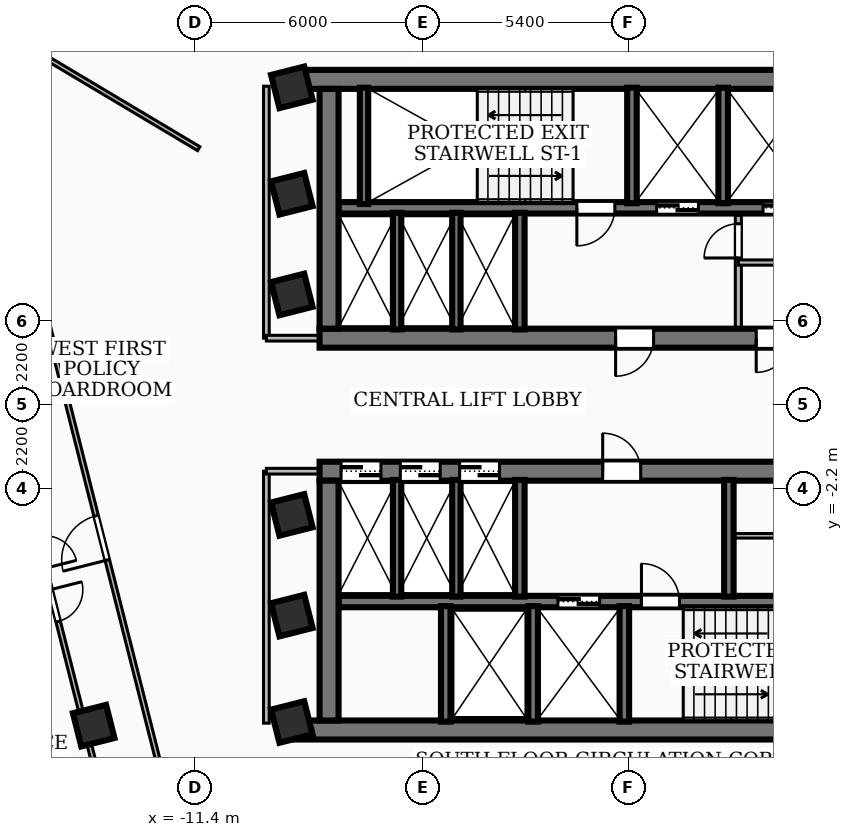
"""IFC4 building model, lengths in metres.
Left out: names, types, materials, properties, quantities, classifications, styles, units other than length and angle.
Written with IfcOpenShell. Run it as: python <this file> out.ifc"""

import sys

from ifc_helpers import new_model, si_unit, direction, frame, frame_2d, origin, origin_2d, place, context, subcontext, project, spatial, rectangle, extrude, element, fill, save


model = new_model("IFC4")
c1 = context("Model", 3, precision=1e-05, world=origin(), true_north=direction((0.0, 1.0)))
c2 = subcontext(c1, "Body", "Model", "MODEL_VIEW")
j1 = project(units=[si_unit("LENGTHUNIT", "METRE"), si_unit("PLANEANGLEUNIT", "RADIAN")], contexts=[c1])
p1 = place(None, origin())
s1 = spatial("IfcSite", under=j1, at=p1, CompositionType="ELEMENT")
p2 = place(p1, origin())
s2 = spatial("IfcBuilding", under=s1, at=p2, CompositionType="ELEMENT")
p3 = place(p2, frame((0.0, 0.0, 127.08)))
s3 = spatial("IfcBuildingStorey", under=s2, at=p3, CompositionType="ELEMENT", Elevation=127.08)
p4 = place(p3, frame((-8.78, 8.56, 0.0), z_axis=(0.0, 0.0, 1.0), x_axis=(1.0, 0.0, 0.0)))
e1 = element("IfcWall", 1, at=p4, inside=s3, PredefinedType="SHEAR", context=c2, shape_type="SweptSolid", body=[
    extrude(rectangle(XDim=17.56, YDim=0.5, at=frame_2d((8.78, 0.0))), origin(), (0.0, 0.0, 1.0), 3.34),
])
p5 = place(p3, frame((8.12, 1.75, 0.0), z_axis=(0.0, 0.0, 1.0), x_axis=(-1.0, 0.0, 0.0)))
e2 = element("IfcWall", 2, at=p5, inside=s3, PredefinedType="SHEAR", context=c2, shape_type="SweptSolid", body=[
    extrude(rectangle(XDim=16.24, YDim=0.5, at=frame_2d((8.12, 0.0))), origin(), (0.0, 0.0, 1.0), 3.34),
])
p6 = place(p5, frame((7.45, 0.0, 0.0)))
e3 = element("IfcOpeningElement", 3, at=p6, cuts=e2, PredefinedType="OPENING", context=c2, shape_type="SweptSolid", body=[
    extrude(rectangle(XDim=1.0, YDim=2.1, at=frame_2d((0.5, 1.05))), frame((0.0, 0.26, 0.0), z_axis=(0.0, -1.0, 0.0), x_axis=(1.0, 0.0, 0.0)), (0.0, 0.0, 1.0), 0.52),
])
p7 = place(p5, frame((3.85, 0.0, 0.0)))
e4 = element("IfcOpeningElement", 4, at=p7, cuts=e2, PredefinedType="OPENING", context=c2, shape_type="SweptSolid", body=[
    extrude(rectangle(XDim=0.9, YDim=2.06, at=frame_2d((0.45, 1.03))), frame((0.0, 0.26, 0.0), z_axis=(0.0, -1.0, 0.0), x_axis=(1.0, 0.0, 0.0)), (0.0, 0.0, 1.0), 0.52),
])
p8 = place(p5, frame((2.35, 0.0, 0.0)))
e5 = element("IfcOpeningElement", 5, at=p8, cuts=e2, PredefinedType="OPENING", context=c2, shape_type="SweptSolid", body=[
    extrude(rectangle(XDim=0.9, YDim=2.06, at=frame_2d((0.45, 1.03))), frame((0.0, 0.26, 0.0), z_axis=(0.0, -1.0, 0.0), x_axis=(1.0, 0.0, 0.0)), (0.0, 0.0, 1.0), 0.52),
])
p9 = place(p5, frame((0.8, 0.0, 0.0)))
e6 = element("IfcOpeningElement", 6, at=p9, cuts=e2, PredefinedType="OPENING", context=c2, shape_type="SweptSolid", body=[
    extrude(rectangle(XDim=0.9, YDim=2.06, at=frame_2d((0.45, 1.03))), frame((0.0, 0.26, 0.0), z_axis=(0.0, -1.0, 0.0), x_axis=(1.0, 0.0, 0.0)), (0.0, 0.0, 1.0), 0.52),
])
p10 = place(p3, frame((-7.87, 2.0, 0.0), z_axis=(0.0, 0.0, 1.0), x_axis=(0.0, 1.0, 0.0)))
e7 = element("IfcWall", 7, at=p10, inside=s3, PredefinedType="SHEAR", context=c2, shape_type="SweptSolid", body=[
    extrude(rectangle(XDim=6.31, YDim=0.5, at=frame_2d((3.155, 0.0))), origin(), (0.0, 0.0, 1.0), 3.34),
])
p11 = place(p3, frame((7.62, 5.18, 0.0), z_axis=(0.0, 0.0, 1.0), x_axis=(-1.0, 0.0, 0.0)))
e8 = element("IfcWall", 8, at=p11, inside=s3, PredefinedType="SOLIDWALL", context=c2, shape_type="SweptSolid", body=[
    extrude(rectangle(XDim=15.24, YDim=0.3, at=frame_2d((7.62, 0.0))), origin(), (0.0, 0.0, 1.0), 3.34),
])
p12 = place(p11, frame((5.77, 0.0, 0.0)))
e9 = element("IfcOpeningElement", 9, at=p12, cuts=e8, PredefinedType="OPENING", context=c2, shape_type="SweptSolid", body=[
    extrude(rectangle(XDim=1.1, YDim=2.15, at=frame_2d((0.55, 1.075))), frame((0.0, 0.16, 0.0), z_axis=(0.0, -1.0, 0.0), x_axis=(1.0, 0.0, 0.0)), (0.0, 0.0, 1.0), 0.32),
])
p13 = place(p11, frame((2.97, 0.0, 0.0)))
e10 = element("IfcOpeningElement", 10, at=p13, cuts=e8, PredefinedType="OPENING", context=c2, shape_type="SweptSolid", body=[
    extrude(rectangle(XDim=1.1, YDim=2.15, at=frame_2d((0.55, 1.075))), frame((0.0, 0.16, 0.0), z_axis=(0.0, -1.0, 0.0), x_axis=(1.0, 0.0, 0.0)), (0.0, 0.0, 1.0), 0.32),
])
p14 = place(p11, frame((7.97, 0.0, 0.0)))
e11 = element("IfcOpeningElement", 11, at=p14, cuts=e8, PredefinedType="OPENING", context=c2, shape_type="SweptSolid", body=[
    extrude(rectangle(XDim=1.0, YDim=2.1, at=frame_2d((0.5, 1.05))), frame((0.0, 0.16, 0.0), z_axis=(0.0, -1.0, 0.0), x_axis=(1.0, 0.0, 0.0)), (0.0, 0.0, 1.0), 0.32),
])
p15 = place(p3, frame((8.78, -8.56, 0.0), z_axis=(0.0, 0.0, 1.0), x_axis=(-1.0, 0.0, 0.0)))
e12 = element("IfcWall", 12, at=p15, inside=s3, PredefinedType="SHEAR", context=c2, shape_type="SweptSolid", body=[
    extrude(rectangle(XDim=17.56, YDim=0.5, at=frame_2d((8.78, 0.0))), origin(), (0.0, 0.0, 1.0), 3.34),
])
p16 = place(p3, frame((-8.12, -1.75, 0.0), z_axis=(0.0, 0.0, 1.0), x_axis=(1.0, 0.0, 0.0)))
e13 = element("IfcWall", 13, at=p16, inside=s3, PredefinedType="SHEAR", context=c2, shape_type="SweptSolid", body=[
    extrude(rectangle(XDim=16.24, YDim=0.5, at=frame_2d((8.12, 0.0))), origin(), (0.0, 0.0, 1.0), 3.34),
])
p17 = place(p16, frame((7.45, 0.0, 0.0)))
e14 = element("IfcOpeningElement", 14, at=p17, cuts=e13, PredefinedType="OPENING", context=c2, shape_type="SweptSolid", body=[
    extrude(rectangle(XDim=1.0, YDim=2.1, at=frame_2d((0.5, 1.05))), frame((0.0, 0.26, 0.0), z_axis=(0.0, -1.0, 0.0), x_axis=(1.0, 0.0, 0.0)), (0.0, 0.0, 1.0), 0.52),
])
p18 = place(p16, frame((12.65, 0.0, 0.0)))
e15 = element("IfcOpeningElement", 15, at=p18, cuts=e13, PredefinedType="OPENING", context=c2, shape_type="SweptSolid", body=[
    extrude(rectangle(XDim=0.9, YDim=2.06, at=frame_2d((0.45, 1.03))), frame((0.0, 0.26, 0.0), z_axis=(0.0, -1.0, 0.0), x_axis=(1.0, 0.0, 0.0)), (0.0, 0.0, 1.0), 0.52),
])
p19 = place(p16, frame((0.565, 0.0, 0.0)))
e16 = element("IfcOpeningElement", 16, at=p19, cuts=e13, PredefinedType="OPENING", context=c2, shape_type="SweptSolid", body=[
    extrude(rectangle(XDim=1.05, YDim=2.15, at=frame_2d((0.525, 1.075))), frame((0.0, 0.26, 0.0), z_axis=(0.0, -1.0, 0.0), x_axis=(1.0, 0.0, 0.0)), (0.0, 0.0, 1.0), 0.52),
])
p20 = place(p16, frame((2.125, 0.0, 0.0)))
e17 = element("IfcOpeningElement", 17, at=p20, cuts=e13, PredefinedType="OPENING", context=c2, shape_type="SweptSolid", body=[
    extrude(rectangle(XDim=1.05, YDim=2.15, at=frame_2d((0.525, 1.075))), frame((0.0, 0.26, 0.0), z_axis=(0.0, -1.0, 0.0), x_axis=(1.0, 0.0, 0.0)), (0.0, 0.0, 1.0), 0.52),
])
p21 = place(p16, frame((3.685, 0.0, 0.0)))
e18 = element("IfcOpeningElement", 18, at=p21, cuts=e13, PredefinedType="OPENING", context=c2, shape_type="SweptSolid", body=[
    extrude(rectangle(XDim=1.05, YDim=2.15, at=frame_2d((0.525, 1.075))), frame((0.0, 0.26, 0.0), z_axis=(0.0, -1.0, 0.0), x_axis=(1.0, 0.0, 0.0)), (0.0, 0.0, 1.0), 0.52),
])
p22 = place(p3, frame((-7.87, -8.31, 0.0), z_axis=(0.0, 0.0, 1.0), x_axis=(0.0, 1.0, 0.0)))
e19 = element("IfcWall", 19, at=p22, inside=s3, PredefinedType="SHEAR", context=c2, shape_type="SweptSolid", body=[
    extrude(rectangle(XDim=6.31, YDim=0.5, at=frame_2d((3.155, 0.0))), origin(), (0.0, 0.0, 1.0), 3.34),
])
p23 = place(p3, frame((-7.62, -5.18, 0.0), z_axis=(0.0, 0.0, 1.0), x_axis=(1.0, 0.0, 0.0)))
e20 = element("IfcWall", 20, at=p23, inside=s3, PredefinedType="SOLIDWALL", context=c2, shape_type="SweptSolid", body=[
    extrude(rectangle(XDim=15.24, YDim=0.3, at=frame_2d((7.62, 0.0))), origin(), (0.0, 0.0, 1.0), 3.34),
])
p24 = place(p23, frame((5.77, 0.0, 0.0)))
e21 = element("IfcOpeningElement", 21, at=p24, cuts=e20, PredefinedType="OPENING", context=c2, shape_type="SweptSolid", body=[
    extrude(rectangle(XDim=1.1, YDim=2.15, at=frame_2d((0.55, 1.075))), frame((0.0, 0.16, 0.0), z_axis=(0.0, -1.0, 0.0), x_axis=(1.0, 0.0, 0.0)), (0.0, 0.0, 1.0), 0.32),
])
p25 = place(p23, frame((7.97, 0.0, 0.0)))
e22 = element("IfcOpeningElement", 22, at=p25, cuts=e20, PredefinedType="OPENING", context=c2, shape_type="SweptSolid", body=[
    extrude(rectangle(XDim=1.0, YDim=2.1, at=frame_2d((0.5, 1.05))), frame((0.0, 0.16, 0.0), z_axis=(0.0, -1.0, 0.0), x_axis=(1.0, 0.0, 0.0)), (0.0, 0.0, 1.0), 0.32),
])
p26 = place(p3, frame((-6.95, 5.28, 0.0), z_axis=(0.0, 0.0, 1.0), x_axis=(0.0, 1.0, 0.0)))
e23 = element("IfcWall", 23, at=p26, inside=s3, PredefinedType="SOLIDWALL", context=c2, shape_type="SweptSolid", body=[
    extrude(rectangle(XDim=3.06, YDim=0.22, at=frame_2d((1.53, 0.0))), origin(), (0.0, 0.0, 1.0), 3.34),
])
for number, where, z_axis, x_axis in (
    (24, (0.1, 5.3, 0.0), (0.0, 0.0, 1.0), (0.0, 1.0, 0.0)),
    (25, (2.5, 5.3, 0.0), (0.0, 0.0, 1.0), (0.0, 1.0, 0.0)),
):
    element("IfcWall", number, at=place(p3, frame(where, z_axis=z_axis, x_axis=x_axis)), inside=s3, PredefinedType="SOLIDWALL", context=c2, shape_type="SweptSolid", body=[
        extrude(rectangle(XDim=3.04, YDim=0.25, at=frame_2d((1.52, 0.0))), origin(), (0.0, 0.0, 1.0), 3.34),
    ])
p27 = place(p3, frame((-2.85, 1.98, 0.0), z_axis=(0.0, 0.0, 1.0), x_axis=(0.0, 1.0, 0.0)))
e26 = element("IfcWall", 26, at=p27, inside=s3, PredefinedType="SOLIDWALL", context=c2, shape_type="SweptSolid", body=[
    extrude(rectangle(XDim=3.07, YDim=0.25, at=frame_2d((1.535, 0.0))), origin(), (0.0, 0.0, 1.0), 3.34),
])
for number, where, z_axis, x_axis in (
    (27, (-0.1, -8.34, 0.0), (0.0, 0.0, 1.0), (0.0, 1.0, 0.0)),
    (28, (-2.5, -8.34, 0.0), (0.0, 0.0, 1.0), (0.0, 1.0, 0.0)),
    (29, (-4.8, -8.34, 0.0), (0.0, 0.0, 1.0), (0.0, 1.0, 0.0)),
):
    element("IfcWall", number, at=place(p3, frame(where, z_axis=z_axis, x_axis=x_axis)), inside=s3, PredefinedType="SOLIDWALL", context=c2, shape_type="SweptSolid", body=[
        extrude(rectangle(XDim=3.04, YDim=0.25, at=frame_2d((1.52, 0.0))), origin(), (0.0, 0.0, 1.0), 3.34),
    ])
for number, where, z_axis, x_axis in (
    (30, (-2.85, -5.05, 0.0), (0.0, 0.0, 1.0), (0.0, 1.0, 0.0)),
    (31, (2.65, -5.05, 0.0), (0.0, 0.0, 1.0), (0.0, 1.0, 0.0)),
):
    element("IfcWall", number, at=place(p3, frame(where, z_axis=z_axis, x_axis=x_axis)), inside=s3, PredefinedType="SOLIDWALL", context=c2, shape_type="SweptSolid", body=[
        extrude(rectangle(XDim=3.07, YDim=0.25, at=frame_2d((1.535, 0.0))), origin(), (0.0, 0.0, 1.0), 3.34),
    ])
for number, where, z_axis, x_axis in (
    (32, (-6.08, 1.98, 0.0), (0.0, 0.0, 1.0), (0.0, 1.0, 0.0)),
    (33, (-4.52, 1.98, 0.0), (0.0, 0.0, 1.0), (0.0, 1.0, 0.0)),
    (34, (-6.08, -5.05, 0.0), (0.0, 0.0, 1.0), (0.0, 1.0, 0.0)),
    (35, (-4.52, -5.05, 0.0), (0.0, 0.0, 1.0), (0.0, 1.0, 0.0)),
):
    element("IfcWall", number, at=place(p3, frame(where, z_axis=z_axis, x_axis=x_axis)), inside=s3, PredefinedType="SOLIDWALL", context=c2, shape_type="SweptSolid", body=[
        extrude(rectangle(XDim=3.07, YDim=0.22, at=frame_2d((1.535, 0.0))), origin(), (0.0, 0.0, 1.0), 3.34),
    ])
for number, where, z_axis, x_axis in (
    (36, (-8.85, -5.55, 0.0), (0.0, 0.0, 1.0), (0.969, 0.245, 0.0)),
    (37, (-8.85, -2.9, 0.0), (0.0, 0.0, 1.0), (0.969, 0.245, 0.0)),
    (38, (-8.85, 2.9, 0.0), (0.0, 0.0, 1.0), (0.969, 0.245, 0.0)),
    (39, (-8.85, 5.55, 0.0), (0.0, 0.0, 1.0), (0.969, 0.245, 0.0)),
    (40, (-8.85, 8.35, 0.0), (0.0, 0.0, 1.0), (0.969, 0.245, 0.0)),
    (41, (-8.85, -8.35, 0.0), (0.0, 0.0, 1.0), (0.969, 0.245, 0.0)),
    (42, (-14.064, -8.445, 0.0), (0.0, 0.0, 1.0), (0.969, 0.245, 0.0)),
):
    element("IfcColumn", number, at=place(p3, frame(where, z_axis=z_axis, x_axis=x_axis)), inside=s3, PredefinedType="COLUMN", context=c2, shape_type="SweptSolid", body=[
        extrude(rectangle(XDim=0.9, YDim=0.9, at=origin_2d()), origin(), (0.0, 0.0, 1.0), 3.6),
    ])
p28 = place(p3, frame((2.9, 2.04, 0.0), z_axis=(0.0, 0.0, 1.0), x_axis=(0.0, 1.0, 0.0)))
e43 = element("IfcWall", 43, at=p28, inside=s3, PredefinedType="PARTITIONING", context=c2, shape_type="SweptSolid", body=[
    extrude(rectangle(XDim=2.94, YDim=0.16, at=frame_2d((1.47, 0.0))), origin(), (0.0, 0.0, 1.0), 2.57),
])
p29 = place(p28, frame((1.82, 0.0, 0.0)))
e44 = element("IfcOpeningElement", 44, at=p29, cuts=e43, PredefinedType="OPENING", context=c2, shape_type="SweptSolid", body=[
    extrude(rectangle(XDim=0.9, YDim=2.06, at=frame_2d((0.45, 1.03))), frame((0.0, 0.09, 0.0), z_axis=(0.0, -1.0, 0.0), x_axis=(1.0, 0.0, 0.0)), (0.0, 0.0, 1.0), 0.18),
])
p30 = place(p3, frame((2.9, 3.74, 0.0), z_axis=(0.0, 0.0, 1.0), x_axis=(1.0, 0.0, 0.0)))
e45 = element("IfcWall", 45, at=p30, inside=s3, PredefinedType="PARTITIONING", context=c2, shape_type="SweptSolid", body=[
    extrude(rectangle(XDim=4.65, YDim=0.138, at=frame_2d((2.325, 0.0))), origin(), (0.0, 0.0, 1.0), 3.34),
])
p31 = place(p3, frame((2.8, -3.45, 0.0), z_axis=(0.0, 0.0, 1.0), x_axis=(1.0, 0.0, 0.0)))
e46 = element("IfcWall", 46, at=p31, inside=s3, PredefinedType="PARTITIONING", context=c2, shape_type="SweptSolid", body=[
    extrude(rectangle(XDim=4.68, YDim=0.12, at=frame_2d((2.34, 0.0))), origin(), (0.0, 0.0, 1.0), 3.34),
])
p32 = place(p31, frame((1.9, 0.0, 0.0)))
e47 = element("IfcOpeningElement", 47, at=p32, cuts=e46, PredefinedType="OPENING", context=c2, shape_type="SweptSolid", body=[
    extrude(rectangle(XDim=0.86, YDim=2.04, at=frame_2d((0.43, 1.02))), frame((0.0, 0.07, 0.0), z_axis=(0.0, -1.0, 0.0), x_axis=(1.0, 0.0, 0.0)), (0.0, 0.0, 1.0), 0.14),
])
p33 = place(p3, frame((-9.52, 1.75, 0.0), z_axis=(0.0, 0.0, 1.0), x_axis=(0.0, 1.0, 0.0)))
e48 = element("IfcWall", 48, at=p33, inside=s3, PredefinedType="PARTITIONING", context=c2, shape_type="SweptSolid", body=[
    extrude(rectangle(XDim=6.63, YDim=0.15, at=frame_2d((3.315, 0.0))), origin(), (0.0, 0.0, 1.0), 2.57),
])
p34 = place(p3, frame((-7.85, 1.75, 0.0), z_axis=(0.0, 0.0, 1.0), x_axis=(-1.0, 0.0, 0.0)))
e49 = element("IfcWall", 49, at=p34, inside=s3, PredefinedType="PARTITIONING", context=c2, shape_type="SweptSolid", body=[
    extrude(rectangle(XDim=1.67, YDim=0.15, at=frame_2d((0.835, 0.0))), origin(), (0.0, 0.0, 1.0), 2.57),
])
p35 = place(p3, frame((-9.52, -8.38, 0.0), z_axis=(0.0, 0.0, 1.0), x_axis=(0.0, 1.0, 0.0)))
e50 = element("IfcWall", 50, at=p35, inside=s3, PredefinedType="PARTITIONING", context=c2, shape_type="SweptSolid", body=[
    extrude(rectangle(XDim=6.63, YDim=0.15, at=frame_2d((3.315, 0.0))), origin(), (0.0, 0.0, 1.0), 2.57),
])
p36 = place(p3, frame((-7.85, -1.75, 0.0), z_axis=(0.0, 0.0, 1.0), x_axis=(-1.0, 0.0, 0.0)))
e51 = element("IfcWall", 51, at=p36, inside=s3, PredefinedType="PARTITIONING", context=c2, shape_type="SweptSolid", body=[
    extrude(rectangle(XDim=1.67, YDim=0.15, at=frame_2d((0.835, 0.0))), origin(), (0.0, 0.0, 1.0), 2.57),
])
p37 = place(p3, frame((-11.3, 6.736, 0.0), z_axis=(0.0, 0.0, 1.0), x_axis=(-0.858979599017, 0.512009812868, 0.0)))
e52 = element("IfcWall", 52, at=p37, inside=s3, PredefinedType="PARTITIONING", context=c2, shape_type="SweptSolid", body=[
    extrude(rectangle(XDim=6.519, YDim=0.12, at=frame_2d((3.26, 0.0))), origin(), (0.0, 0.0, 1.0), 3.34),
])
p38 = place(p3, frame((-11.342, -13.433, 0.0), z_axis=(0.0, 0.0, 1.0), x_axis=(-0.24525085526, 0.969459652587, 0.0)))
e53 = element("IfcWall", 53, at=p38, inside=s3, PredefinedType="PARTITIONING", context=c2, shape_type="SweptSolid", body=[
    extrude(rectangle(XDim=20.261, YDim=0.12, at=frame_2d((10.13, 0.0))), origin(), (0.0, 0.0, 1.0), 2.57),
])
p39 = place(p38, frame((9.64, 0.0, 0.0)))
e54 = element("IfcOpeningElement", 54, at=p39, cuts=e53, PredefinedType="OPENING", context=c2, shape_type="SweptSolid", body=[
    extrude(rectangle(XDim=1.2, YDim=2.1, at=frame_2d((0.6, 1.05))), frame((0.0, 0.07, 0.0), z_axis=(0.0, -1.0, 0.0), x_axis=(1.0, 0.0, 0.0)), (0.0, 0.0, 1.0), 0.14),
])
p40 = place(p3, frame((-17.032, 2.328, 0.0), z_axis=(0.0, 0.0, 1.0), x_axis=(0.245381918011, -0.969426487318, 0.0)))
e55 = element("IfcWall", 55, at=p40, inside=s3, PredefinedType="PARTITIONING", context=c2, shape_type="SweptSolid", body=[
    extrude(rectangle(XDim=12.65, YDim=0.12, at=frame_2d((6.325, 0.0))), origin(), (0.0, 0.0, 1.0), 2.57),
])
p41 = place(p40, frame((5.985, 0.0, 0.0)))
e56 = element("IfcOpeningElement", 56, at=p41, cuts=e55, PredefinedType="OPENING", context=c2, shape_type="SweptSolid", body=[
    extrude(rectangle(XDim=0.86, YDim=2.04, at=frame_2d((0.43, 1.02))), frame((0.0, 0.07, 0.0), z_axis=(0.0, -1.0, 0.0), x_axis=(1.0, 0.0, 0.0)), (0.0, 0.0, 1.0), 0.14),
])
p42 = place(p40, frame((7.425, 0.0, 0.0)))
e57 = element("IfcOpeningElement", 57, at=p42, cuts=e55, PredefinedType="OPENING", context=c2, shape_type="SweptSolid", body=[
    extrude(rectangle(XDim=0.86, YDim=2.04, at=frame_2d((0.43, 1.02))), frame((0.0, 0.07, 0.0), z_axis=(0.0, -1.0, 0.0), x_axis=(1.0, 0.0, 0.0)), (0.0, 0.0, 1.0), 0.14),
])
p43 = place(p6, origin())
e58 = element("IfcDoor", 58, at=p43, inside=s3, OperationType="SINGLE_SWING_RIGHT", PredefinedType="DOOR", context=c2, shape_type="SweptSolid", body=[
    extrude(rectangle(XDim=1.0, YDim=2.1, at=frame_2d((0.5, 1.05))), frame((0.0, 0.025, 0.0), z_axis=(0.0, -1.0, 0.0), x_axis=(1.0, 0.0, 0.0)), (0.0, 0.0, 1.0), 0.05),
])
fill(e3, e58)
p44 = place(p17, origin())
e59 = element("IfcDoor", 59, at=p44, inside=s3, OperationType="SINGLE_SWING_LEFT", PredefinedType="DOOR", context=c2, shape_type="SweptSolid", body=[
    extrude(rectangle(XDim=1.0, YDim=2.1, at=frame_2d((0.5, 1.05))), frame((0.0, 0.025, 0.0), z_axis=(0.0, -1.0, 0.0), x_axis=(1.0, 0.0, 0.0)), (0.0, 0.0, 1.0), 0.05),
])
fill(e14, e59)
p45 = place(p12, origin())
e60 = element("IfcDoor", 60, at=p45, inside=s3, OperationType="DOUBLE_DOOR_SLIDING", PredefinedType="DOOR", context=c2, shape_type="SweptSolid", body=[
    extrude(rectangle(XDim=1.1, YDim=2.15, at=frame_2d((0.55, 1.075))), frame((0.0, 0.025, 0.0), z_axis=(0.0, -1.0, 0.0), x_axis=(1.0, 0.0, 0.0)), (0.0, 0.0, 1.0), 0.05),
])
fill(e9, e60)
p46 = place(p13, origin())
e61 = element("IfcDoor", 61, at=p46, inside=s3, OperationType="DOUBLE_DOOR_SLIDING", PredefinedType="DOOR", context=c2, shape_type="SweptSolid", body=[
    extrude(rectangle(XDim=1.1, YDim=2.15, at=frame_2d((0.55, 1.075))), frame((0.0, 0.025, 0.0), z_axis=(0.0, -1.0, 0.0), x_axis=(1.0, 0.0, 0.0)), (0.0, 0.0, 1.0), 0.05),
])
fill(e10, e61)
p47 = place(p14, origin())
e62 = element("IfcDoor", 62, at=p47, inside=s3, OperationType="SINGLE_SWING_RIGHT", PredefinedType="DOOR", context=c2, shape_type="SweptSolid", body=[
    extrude(rectangle(XDim=1.0, YDim=2.1, at=frame_2d((0.5, 1.05))), frame((0.0, 0.025, 0.0), z_axis=(0.0, -1.0, 0.0), x_axis=(1.0, 0.0, 0.0)), (0.0, 0.0, 1.0), 0.05),
])
fill(e11, e62)
p48 = place(p24, origin())
e63 = element("IfcDoor", 63, at=p48, inside=s3, OperationType="DOUBLE_DOOR_SLIDING", PredefinedType="DOOR", context=c2, shape_type="SweptSolid", body=[
    extrude(rectangle(XDim=1.1, YDim=2.15, at=frame_2d((0.55, 1.075))), frame((0.0, 0.025, 0.0), z_axis=(0.0, -1.0, 0.0), x_axis=(1.0, 0.0, 0.0)), (0.0, 0.0, 1.0), 0.05),
])
fill(e21, e63)
p49 = place(p25, origin())
e64 = element("IfcDoor", 64, at=p49, inside=s3, OperationType="SINGLE_SWING_LEFT", PredefinedType="DOOR", context=c2, shape_type="SweptSolid", body=[
    extrude(rectangle(XDim=1.0, YDim=2.1, at=frame_2d((0.5, 1.05))), frame((0.0, 0.025, 0.0), z_axis=(0.0, -1.0, 0.0), x_axis=(1.0, 0.0, 0.0)), (0.0, 0.0, 1.0), 0.05),
])
fill(e22, e64)
p50 = place(p19, origin())
e65 = element("IfcDoor", 65, at=p50, inside=s3, OperationType="DOUBLE_DOOR_SLIDING", PredefinedType="DOOR", context=c2, shape_type="SweptSolid", body=[
    extrude(rectangle(XDim=1.05, YDim=2.15, at=frame_2d((0.525, 1.075))), frame((0.0, 0.025, 0.0), z_axis=(0.0, -1.0, 0.0), x_axis=(1.0, 0.0, 0.0)), (0.0, 0.0, 1.0), 0.05),
])
fill(e16, e65)
p51 = place(p20, origin())
e66 = element("IfcDoor", 66, at=p51, inside=s3, OperationType="DOUBLE_DOOR_SLIDING", PredefinedType="DOOR", context=c2, shape_type="SweptSolid", body=[
    extrude(rectangle(XDim=1.05, YDim=2.15, at=frame_2d((0.525, 1.075))), frame((0.0, 0.025, 0.0), z_axis=(0.0, -1.0, 0.0), x_axis=(1.0, 0.0, 0.0)), (0.0, 0.0, 1.0), 0.05),
])
fill(e17, e66)
p52 = place(p21, origin())
e67 = element("IfcDoor", 67, at=p52, inside=s3, OperationType="DOUBLE_DOOR_SLIDING", PredefinedType="DOOR", context=c2, shape_type="SweptSolid", body=[
    extrude(rectangle(XDim=1.05, YDim=2.15, at=frame_2d((0.525, 1.075))), frame((0.0, 0.025, 0.0), z_axis=(0.0, -1.0, 0.0), x_axis=(1.0, 0.0, 0.0)), (0.0, 0.0, 1.0), 0.05),
])
fill(e18, e67)
p53 = place(p7, origin())
e68 = element("IfcDoor", 68, at=p53, inside=s3, OperationType="SINGLE_SWING_RIGHT", PredefinedType="DOOR", context=c2, shape_type="SweptSolid", body=[
    extrude(rectangle(XDim=0.9, YDim=2.06, at=frame_2d((0.45, 1.03))), frame((0.0, 0.025, 0.0), z_axis=(0.0, -1.0, 0.0), x_axis=(1.0, 0.0, 0.0)), (0.0, 0.0, 1.0), 0.05),
])
fill(e4, e68)
p54 = place(p29, origin())
e69 = element("IfcDoor", 69, at=p54, inside=s3, OperationType="SINGLE_SWING_LEFT", PredefinedType="DOOR", context=c2, shape_type="SweptSolid", body=[
    extrude(rectangle(XDim=0.9, YDim=2.06, at=frame_2d((0.45, 1.03))), frame((0.0, 0.025, 0.0), z_axis=(0.0, -1.0, 0.0), x_axis=(1.0, 0.0, 0.0)), (0.0, 0.0, 1.0), 0.05),
])
fill(e44, e69)
p55 = place(p39, origin())
e70 = element("IfcDoor", 70, at=p55, inside=s3, OperationType="SINGLE_SWING_LEFT", PredefinedType="DOOR", context=c2, shape_type="SweptSolid", body=[
    extrude(rectangle(XDim=1.2, YDim=2.1, at=frame_2d((0.6, 1.05))), frame((0.0, 0.025, 0.0), z_axis=(0.0, -1.0, 0.0), x_axis=(1.0, 0.0, 0.0)), (0.0, 0.0, 1.0), 0.05),
])
fill(e54, e70)
p56 = place(p42, origin())
e71 = element("IfcDoor", 71, at=p56, inside=s3, OperationType="SINGLE_SWING_LEFT", PredefinedType="DOOR", context=c2, shape_type="SweptSolid", body=[
    extrude(rectangle(XDim=0.86, YDim=2.04, at=frame_2d((0.43, 1.02))), frame((0.0, 0.025, 0.0), z_axis=(0.0, -1.0, 0.0), x_axis=(1.0, 0.0, 0.0)), (0.0, 0.0, 1.0), 0.05),
])
fill(e57, e71)
save(model, sys.argv[1])
